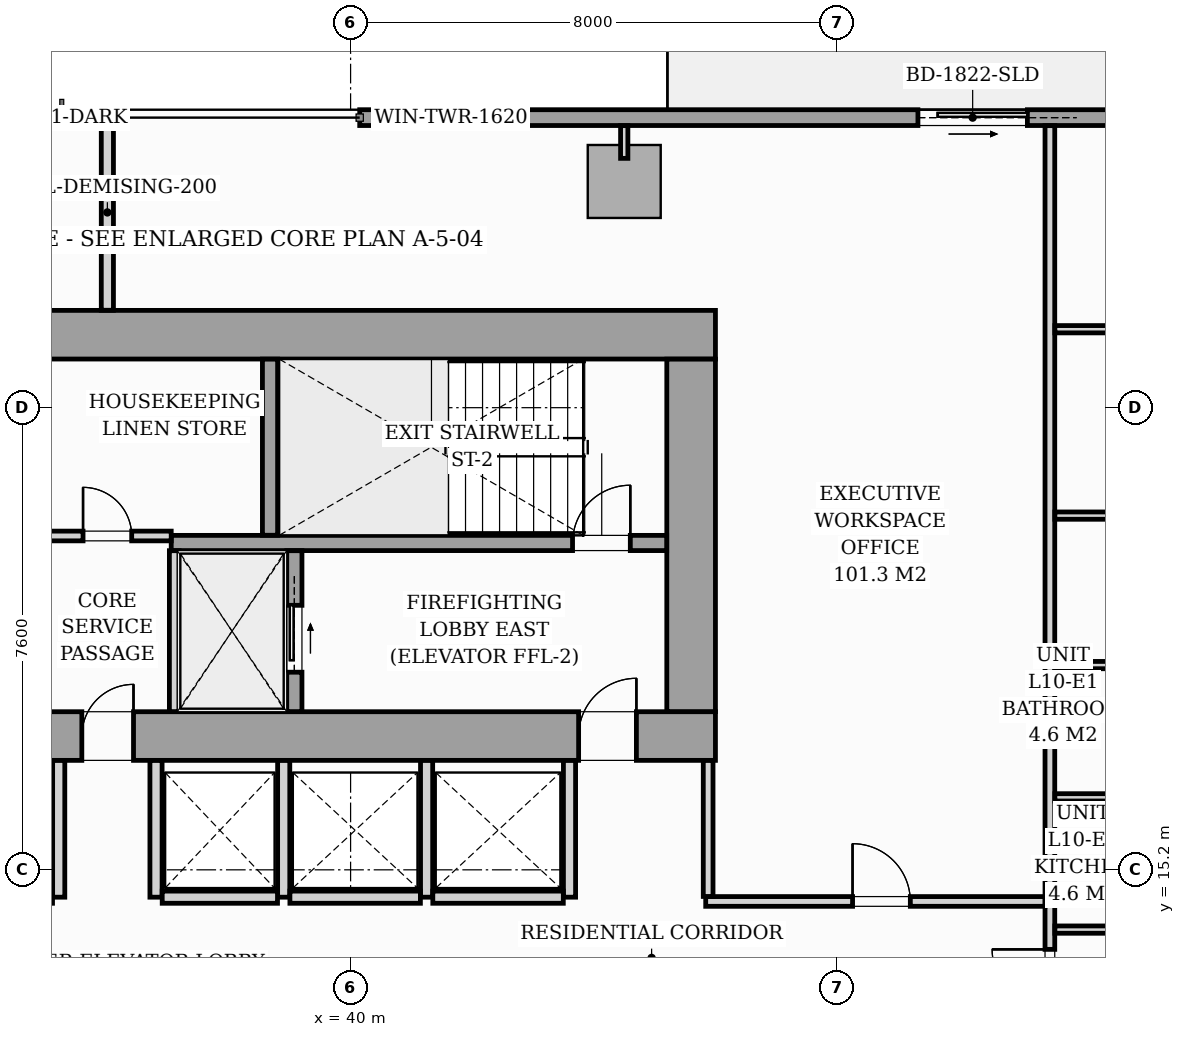
"""IFC4 building model, lengths in metres.
Left out: names, types, materials, properties, quantities, classifications, styles, units other than length and angle.
Written with IfcOpenShell. Run it as: python <this file> out.ifc"""

import sys

from ifc_helpers import new_model, si_unit, direction, frame, frame_2d, origin, origin_2d, place, context, subcontext, project, spatial, rectangle, i_section, extrude, source, transform, mapped, element, fill, save


model = new_model("IFC4")
c1 = context("Model", 3, precision=1e-05, world=origin(), true_north=direction((0.0, 1.0)))
c2 = subcontext(c1, "Body", "Model", "MODEL_VIEW")
j1 = project(units=[si_unit("LENGTHUNIT", "METRE"), si_unit("PLANEANGLEUNIT", "RADIAN")], contexts=[c1])
p1 = place(None, origin())
s1 = spatial("IfcSite", under=j1, at=p1, CompositionType="ELEMENT")
p2 = place(p1, origin())
s2 = spatial("IfcBuilding", under=s1, at=p2, CompositionType="ELEMENT")
p3 = place(p2, frame((0.0, 0.0, 39.0)))
s3 = spatial("IfcBuildingStorey", under=s2, at=p3, CompositionType="ELEMENT", Elevation=39.0)
m1 = source(origin(), c2, "Body", "SweptSolid", [
    extrude(i_section(OverallWidth=0.437, OverallDepth=0.514, WebThickness=0.061, FlangeThickness=0.097, FilletRadius=0.018, at=origin_2d()), origin(), (0.0, 0.0, 1.0), 3.196),
])
for number, where, z_axis, x_axis in (
    (1, (38.88, 17.4, 0.002), (0.0, 0.0, 1.0), (1.0, 0.0, 0.0)),
    (2, (45.6, 17.4, 0.002), (0.0, 0.0, 1.0), (1.0, 0.0, 0.0)),
    (3, (38.88, 24.0, 0.002), (0.0, 0.0, 1.0), (1.0, 0.0, 0.0)),
    (4, (45.6, 24.0, 0.002), (0.0, 0.0, 1.0), (1.0, 0.0, 0.0)),
):
    element("IfcColumn", number, at=place(p3, frame(where, z_axis=z_axis, x_axis=x_axis)), inside=s3, PredefinedType="PILASTER", context=c2, shape_type="MappedRepresentation", body=[
        mapped(m1, transform((0.0, 0.0, 0.0), scale=1.0)),
    ])
m2 = source(origin(), c2, "Body", "SweptSolid", [
    extrude(rectangle(XDim=1.2, YDim=1.2, at=origin_2d()), origin(), (0.0, 0.0, 1.0), 3.196),
])
p4 = place(p3, frame((44.5, 26.52, 0.002), z_axis=(0.0, 0.0, 1.0), x_axis=(1.0, 0.0, 0.0)))
e5 = element("IfcColumn", 5, at=p4, inside=s3, PredefinedType="COLUMN", context=c2, shape_type="MappedRepresentation", body=[
    mapped(m2, transform((0.0, 0.0, 0.0), scale=1.0)),
])
p5 = place(p3, frame((40.15, 27.57, 0.0), z_axis=(0.0, 0.0, 1.0), x_axis=(1.0, 0.0, 0.0)))
e6 = element("IfcWall", 6, at=p5, inside=s3, PredefinedType="STANDARD", context=c2, shape_type="SweptSolid", body=[
    extrude(rectangle(XDim=17.15, YDim=0.26, at=frame_2d((8.575, 0.0))), origin(), (0.0, 0.0, 1.0), 2.94),
])
p6 = place(p5, frame((9.18, 0.0, 0.0)))
e7 = element("IfcOpeningElement", 7, at=p6, cuts=e6, PredefinedType="OPENING", context=c2, shape_type="SweptSolid", body=[
    extrude(rectangle(XDim=1.8, YDim=2.06, at=frame_2d((0.9, 1.03))), frame((0.0, 0.14, 0.0), z_axis=(0.0, -1.0, 0.0), x_axis=(1.0, 0.0, 0.0)), (0.0, 0.0, 1.0), 0.28),
])
p7 = place(p5, frame((0.7, 0.0, 0.65)))
e8 = element("IfcOpeningElement", 8, at=p7, cuts=e6, PredefinedType="OPENING", context=c2, shape_type="SweptSolid", body=[
    extrude(rectangle(XDim=1.6, YDim=1.5, at=frame_2d((0.8, 0.75))), frame((0.0, 0.14, 0.0), z_axis=(0.0, -1.0, 0.0), x_axis=(1.0, 0.0, 0.0)), (0.0, 0.0, 1.0), 0.28),
])
p8 = place(p3, frame((26.0, 17.4, 0.0), z_axis=(0.0, 0.0, 1.0), x_axis=(1.0, 0.0, 0.0)))
e9 = element("IfcWall", 9, at=p8, inside=s3, PredefinedType="SHEAR", context=c2, shape_type="SweptSolid", body=[
    extrude(rectangle(XDim=20.0, YDim=0.8, at=frame_2d((10.0, 0.0))), origin(), (0.0, 0.0, 1.0), 3.2),
])
p9 = place(p8, frame((1.15, 0.0, 0.0)))
e10 = element("IfcOpeningElement", 10, at=p9, cuts=e9, PredefinedType="OPENING", context=c2, shape_type="SweptSolid", body=[
    extrude(rectangle(XDim=0.95, YDim=2.06, at=frame_2d((0.475, 1.03))), frame((0.0, 0.41, 0.0), z_axis=(0.0, -1.0, 0.0), x_axis=(1.0, 0.0, 0.0)), (0.0, 0.0, 1.0), 0.82),
])
p10 = place(p8, frame((9.58, 0.0, 0.0)))
e11 = element("IfcOpeningElement", 11, at=p10, cuts=e9, PredefinedType="OPENING", context=c2, shape_type="SweptSolid", body=[
    extrude(rectangle(XDim=0.85, YDim=2.0, at=frame_2d((0.425, 1.0))), frame((0.0, 0.41, 0.0), z_axis=(0.0, -1.0, 0.0), x_axis=(1.0, 0.0, 0.0)), (0.0, 0.0, 1.0), 0.82),
])
p11 = place(p8, frame((17.75, 0.0, 0.0)))
e12 = element("IfcOpeningElement", 12, at=p11, cuts=e9, PredefinedType="OPENING", context=c2, shape_type="SweptSolid", body=[
    extrude(rectangle(XDim=0.95, YDim=2.06, at=frame_2d((0.475, 1.03))), frame((0.0, 0.41, 0.0), z_axis=(0.0, -1.0, 0.0), x_axis=(1.0, 0.0, 0.0)), (0.0, 0.0, 1.0), 0.82),
])
p12 = place(p3, frame((26.0, 24.0, 0.0), z_axis=(0.0, 0.0, 1.0), x_axis=(1.0, 0.0, 0.0)))
e13 = element("IfcWall", 13, at=p12, inside=s3, PredefinedType="SHEAR", context=c2, shape_type="SweptSolid", body=[
    extrude(rectangle(XDim=20.0, YDim=0.8, at=frame_2d((10.0, 0.0))), origin(), (0.0, 0.0, 1.0), 3.2),
])
p13 = place(p3, frame((45.6, 17.802, 0.0), z_axis=(0.0, 0.0, 1.0), x_axis=(0.0, 1.0, 0.0)))
e14 = element("IfcWall", 14, at=p13, inside=s3, PredefinedType="SHEAR", context=c2, shape_type="SweptSolid", body=[
    extrude(rectangle(XDim=5.796, YDim=0.8, at=frame_2d((2.898, 0.0))), origin(), (0.0, 0.0, 1.0), 3.2),
])
p14 = place(p3, frame((37.05, 20.575, 0.0), z_axis=(0.0, 0.0, 1.0), x_axis=(1.0, 0.0, 0.0)))
e15 = element("IfcWall", 15, at=p14, inside=s3, PredefinedType="SOLIDWALL", context=c2, shape_type="SweptSolid", body=[
    extrude(rectangle(XDim=8.148, YDim=0.25, at=frame_2d((4.074, 0.0))), origin(), (0.0, 0.0, 1.0), 3.2),
])
p15 = place(p14, frame((6.6, 0.0, 0.0)))
e16 = element("IfcOpeningElement", 16, at=p15, cuts=e15, PredefinedType="OPENING", context=c2, shape_type="SweptSolid", body=[
    extrude(rectangle(XDim=0.95, YDim=2.06, at=frame_2d((0.475, 1.03))), frame((0.0, 0.135, 0.0), z_axis=(0.0, -1.0, 0.0), x_axis=(1.0, 0.0, 0.0)), (0.0, 0.0, 1.0), 0.27),
])
p16 = place(p3, frame((38.675, 20.702, 0.0), z_axis=(0.0, 0.0, 1.0), x_axis=(0.0, 1.0, 0.0)))
e17 = element("IfcWall", 17, at=p16, inside=s3, PredefinedType="SOLIDWALL", context=c2, shape_type="SweptSolid", body=[
    extrude(rectangle(XDim=2.896, YDim=0.25, at=frame_2d((1.448, 0.0))), origin(), (0.0, 0.0, 1.0), 3.2),
])
p17 = place(p3, frame((37.1, 17.802, 0.0), z_axis=(0.0, 0.0, 1.0), x_axis=(0.0, 1.0, 0.0)))
e18 = element("IfcWall", 18, at=p17, inside=s3, PredefinedType="PARTITIONING", context=c2, shape_type="SweptSolid", body=[
    extrude(rectangle(XDim=2.646, YDim=0.16, at=frame_2d((1.323, 0.0))), origin(), (0.0, 0.0, 1.0), 2.94),
])
p18 = place(p3, frame((39.075, 17.802, 0.0), z_axis=(0.0, 0.0, 1.0), x_axis=(0.0, 1.0, 0.0)))
e19 = element("IfcWall", 19, at=p18, inside=s3, PredefinedType="SOLIDWALL", context=c2, shape_type="SweptSolid", body=[
    extrude(rectangle(XDim=2.646, YDim=0.25, at=frame_2d((1.323, 0.0))), origin(), (0.0, 0.0, 1.0), 3.2),
])
p19 = place(p18, frame((0.648, 0.0, 0.0)))
e20 = element("IfcOpeningElement", 20, at=p19, cuts=e19, PredefinedType="OPENING", context=c2, shape_type="SweptSolid", body=[
    extrude(rectangle(XDim=1.1, YDim=2.08, at=frame_2d((0.55, 1.04))), frame((0.0, 0.135, 0.0), z_axis=(0.0, -1.0, 0.0), x_axis=(1.0, 0.0, 0.0)), (0.0, 0.0, 1.0), 0.27),
])
p20 = place(p3, frame((34.95, 20.69, 0.0), z_axis=(0.0, 0.0, 1.0), x_axis=(1.0, 0.0, 0.0)))
e21 = element("IfcWall", 21, at=p20, inside=s3, PredefinedType="PARTITIONING", context=c2, shape_type="SweptSolid", body=[
    extrude(rectangle(XDim=2.1, YDim=0.16, at=frame_2d((1.05, 0.0))), origin(), (0.0, 0.0, 1.0), 2.94),
])
p21 = place(p20, frame((0.65, 0.0, 0.0)))
e22 = element("IfcOpeningElement", 22, at=p21, cuts=e21, PredefinedType="OPENING", context=c2, shape_type="SweptSolid", body=[
    extrude(rectangle(XDim=0.8, YDim=2.05, at=frame_2d((0.4, 1.025))), frame((0.0, 0.09, 0.0), z_axis=(0.0, -1.0, 0.0), x_axis=(1.0, 0.0, 0.0)), (0.0, 0.0, 1.0), 0.18),
])
for number, where, z_axis, x_axis in (
    (23, (35.2, 14.75, 0.0), (0.0, 0.0, 1.0), (0.0, 1.0, 0.0)),
    (24, (36.8, 14.75, 0.0), (0.0, 0.0, 1.0), (0.0, 1.0, 0.0)),
    (25, (38.9, 14.75, 0.0), (0.0, 0.0, 1.0), (0.0, 1.0, 0.0)),
):
    element("IfcWall", number, at=place(p3, frame(where, z_axis=z_axis, x_axis=x_axis)), inside=s3, PredefinedType="PARTITIONING", context=c2, shape_type="SweptSolid", body=[
        extrude(rectangle(XDim=2.248, YDim=0.2, at=frame_2d((1.124, 0.0))), origin(), (0.0, 0.0, 1.0), 2.94),
    ])
p22 = place(p3, frame((36.902, 14.75, 0.0), z_axis=(0.0, 0.0, 1.0), x_axis=(1.0, 0.0, 0.0)))
e26 = element("IfcWall", 26, at=p22, inside=s3, PredefinedType="PARTITIONING", context=c2, shape_type="SweptSolid", body=[
    extrude(rectangle(XDim=1.896, YDim=0.2, at=frame_2d((0.948, 0.0))), origin(), (0.0, 0.0, 1.0), 2.94),
])
for number, where, z_axis, x_axis in (
    (27, (41.25, 14.75, 0.0), (0.0, 0.0, 1.0), (0.0, 1.0, 0.0)),
    (28, (43.6, 14.75, 0.0), (0.0, 0.0, 1.0), (0.0, 1.0, 0.0)),
):
    element("IfcWall", number, at=place(p3, frame(where, z_axis=z_axis, x_axis=x_axis)), inside=s3, PredefinedType="PARTITIONING", context=c2, shape_type="SweptSolid", body=[
        extrude(rectangle(XDim=2.248, YDim=0.2, at=frame_2d((1.124, 0.0))), origin(), (0.0, 0.0, 1.0), 2.94),
    ])
for number, where, z_axis, x_axis in (
    (29, (39.002, 14.75, 0.0), (0.0, 0.0, 1.0), (1.0, 0.0, 0.0)),
    (30, (41.352, 14.75, 0.0), (0.0, 0.0, 1.0), (1.0, 0.0, 0.0)),
):
    element("IfcWall", number, at=place(p3, frame(where, z_axis=z_axis, x_axis=x_axis)), inside=s3, PredefinedType="PARTITIONING", context=c2, shape_type="SweptSolid", body=[
        extrude(rectangle(XDim=2.146, YDim=0.2, at=frame_2d((1.073, 0.0))), origin(), (0.0, 0.0, 1.0), 2.94),
    ])
p23 = place(p3, frame((51.5, 12.572, 0.0), z_axis=(0.0, 0.0, 1.0), x_axis=(0.0, 1.0, 0.0)))
e31 = element("IfcWall", 31, at=p23, inside=s3, PredefinedType="PARTITIONING", context=c2, shape_type="SweptSolid", body=[
    extrude(rectangle(XDim=14.866, YDim=0.16, at=frame_2d((7.433, 0.0))), origin(), (0.0, 0.0, 1.0), 2.94),
])
p24 = place(p23, frame((0.37, 0.0, 0.0)))
e32 = element("IfcOpeningElement", 32, at=p24, cuts=e31, PredefinedType="OPENING", context=c2, shape_type="SweptSolid", body=[
    extrude(rectangle(XDim=0.95, YDim=2.06, at=frame_2d((0.475, 1.03))), frame((0.0, 0.09, 0.0), z_axis=(0.0, -1.0, 0.0), x_axis=(1.0, 0.0, 0.0)), (0.0, 0.0, 1.0), 0.18),
])
p25 = place(p3, frame((36.0, 24.402, 0.0), z_axis=(0.0, 0.0, 1.0), x_axis=(0.0, 1.0, 0.0)))
e33 = element("IfcWall", 33, at=p25, inside=s3, PredefinedType="PARTITIONING", context=c2, shape_type="SweptSolid", body=[
    extrude(rectangle(XDim=3.218, YDim=0.2, at=frame_2d((1.609, 0.0))), origin(), (0.0, 0.0, 1.0), 2.94),
])
p26 = place(p3, frame((51.582, 16.392, 0.0), z_axis=(0.0, 0.0, 1.0), x_axis=(1.0, 0.0, 0.0)))
e34 = element("IfcWall", 34, at=p26, inside=s3, PredefinedType="PARTITIONING", context=c2, shape_type="SweptSolid", body=[
    extrude(rectangle(XDim=2.256, YDim=0.12, at=frame_2d((1.128, 0.0))), origin(), (0.0, 0.0, 1.0), 2.045),
])
for number, where, z_axis, x_axis in (
    (35, (51.582, 14.217, 0.0), (0.0, 0.0, 1.0), (1.0, 0.0, 0.0)),
    (36, (51.582, 18.567, 0.0), (0.0, 0.0, 1.0), (1.0, 0.0, 0.0)),
):
    element("IfcWall", number, at=place(p3, frame(where, z_axis=z_axis, x_axis=x_axis)), inside=s3, PredefinedType="PARTITIONING", context=c2, shape_type="SweptSolid", body=[
        extrude(rectangle(XDim=2.256, YDim=0.12, at=frame_2d((1.128, 0.0))), origin(), (0.0, 0.0, 1.0), 2.94),
    ])
p27 = place(p3, frame((51.582, 24.09, 0.0), z_axis=(0.0, 0.0, 1.0), x_axis=(1.0, 0.0, 0.0)))
e37 = element("IfcWall", 37, at=p27, inside=s3, PredefinedType="PARTITIONING", context=c2, shape_type="SweptSolid", body=[
    extrude(rectangle(XDim=8.138, YDim=0.12, at=frame_2d((4.069, 0.0))), origin(), (0.0, 0.0, 1.0), 2.94),
])
p28 = place(p27, frame((3.653, 0.0, 0.0)))
e38 = element("IfcOpeningElement", 38, at=p28, cuts=e37, PredefinedType="OPENING", context=c2, shape_type="SweptSolid", body=[
    extrude(rectangle(XDim=0.85, YDim=2.05, at=frame_2d((0.425, 1.025))), frame((0.0, 0.07, 0.0), z_axis=(0.0, -1.0, 0.0), x_axis=(1.0, 0.0, 0.0)), (0.0, 0.0, 1.0), 0.14),
])
p29 = place(p3, frame((51.582, 21.025, 0.0), z_axis=(0.0, 0.0, 1.0), x_axis=(1.0, 0.0, 0.0)))
e39 = element("IfcWall", 39, at=p29, inside=s3, PredefinedType="PARTITIONING", context=c2, shape_type="SweptSolid", body=[
    extrude(rectangle(XDim=8.138, YDim=0.12, at=frame_2d((4.069, 0.0))), origin(), (0.0, 0.0, 1.0), 2.94),
])
p30 = place(p29, frame((3.653, 0.0, 0.0)))
e40 = element("IfcOpeningElement", 40, at=p30, cuts=e39, PredefinedType="OPENING", context=c2, shape_type="SweptSolid", body=[
    extrude(rectangle(XDim=0.85, YDim=2.05, at=frame_2d((0.425, 1.025))), frame((0.0, 0.07, 0.0), z_axis=(0.0, -1.0, 0.0), x_axis=(1.0, 0.0, 0.0)), (0.0, 0.0, 1.0), 0.14),
])
p31 = place(p3, frame((45.84, 14.68, 0.0), z_axis=(0.0, 0.0, 1.0), x_axis=(1.0, 0.0, 0.0)))
e41 = element("IfcWall", 41, at=p31, inside=s3, PredefinedType="PARTITIONING", context=c2, shape_type="SweptSolid", body=[
    extrude(rectangle(XDim=5.578, YDim=0.16, at=frame_2d((2.789, 0.0))), origin(), (0.0, 0.0, 1.0), 2.94),
])
p32 = place(p31, frame((2.415, 0.0, 0.0)))
e42 = element("IfcOpeningElement", 42, at=p32, cuts=e41, PredefinedType="OPENING", context=c2, shape_type="SweptSolid", body=[
    extrude(rectangle(XDim=0.95, YDim=2.06, at=frame_2d((0.475, 1.03))), frame((0.0, 0.09, 0.0), z_axis=(0.0, -1.0, 0.0), x_axis=(1.0, 0.0, 0.0)), (0.0, 0.0, 1.0), 0.18),
])
p33 = place(p3, frame((45.88, 14.762, 0.0), z_axis=(0.0, 0.0, 1.0), x_axis=(0.0, 1.0, 0.0)))
e43 = element("IfcWall", 43, at=p33, inside=s3, PredefinedType="PARTITIONING", context=c2, shape_type="SweptSolid", body=[
    extrude(rectangle(XDim=2.236, YDim=0.16, at=frame_2d((1.118, 0.0))), origin(), (0.0, 0.0, 1.0), 2.94),
])
p34 = place(p3, frame((44.5, 26.9, 0.0), z_axis=(0.0, 0.0, 1.0), x_axis=(0.0, 1.0, 0.0)))
e44 = element("IfcWall", 44, at=p34, inside=s3, PredefinedType="PARTITIONING", context=c2, shape_type="SweptSolid", body=[
    extrude(rectangle(XDim=0.538, YDim=0.12, at=frame_2d((0.269, 0.0))), origin(), (0.0, 0.0, 1.0), 2.94),
])
m3 = source(origin(), c2, "Body", "SweptSolid", [
    extrude(rectangle(XDim=1.8, YDim=2.06, at=frame_2d((0.9, 1.03))), frame((0.0, 0.025, 0.0), z_axis=(0.0, -1.0, 0.0), x_axis=(1.0, 0.0, 0.0)), (0.0, 0.0, 1.0), 0.05),
])
p35 = place(p6, origin())
e45 = element("IfcDoor", 45, at=p35, inside=s3, OperationType="SLIDING_TO_RIGHT", PredefinedType="DOOR", context=c2, shape_type="MappedRepresentation", body=[
    mapped(m3, transform((0.0, 0.0, 0.0), scale=1.0)),
])
fill(e7, e45)
m4 = source(origin(), c2, "Body", "SweptSolid", [
    extrude(rectangle(XDim=1.6, YDim=1.5, at=frame_2d((0.8, 0.75))), frame((0.0, 0.03, 0.0), z_axis=(0.0, -1.0, 0.0), x_axis=(1.0, 0.0, 0.0)), (0.0, 0.0, 1.0), 0.06),
])
p36 = place(p7, origin())
e46 = element("IfcWindow", 46, at=p36, inside=s3, PartitioningType="SINGLE_PANEL", PredefinedType="WINDOW", context=c2, shape_type="MappedRepresentation", body=[
    mapped(m4, transform((0.0, 0.0, 0.0), scale=1.0)),
])
fill(e8, e46)
m5 = source(origin(), c2, "Body", "SweptSolid", [
    extrude(rectangle(XDim=0.85, YDim=2.0, at=frame_2d((0.425, 1.0))), frame((0.0, 0.025, 0.0), z_axis=(0.0, -1.0, 0.0), x_axis=(1.0, 0.0, 0.0)), (0.0, 0.0, 1.0), 0.05),
])
p37 = place(p10, origin())
e47 = element("IfcDoor", 47, at=p37, inside=s3, OperationType="SINGLE_SWING_RIGHT", PredefinedType="DOOR", context=c2, shape_type="MappedRepresentation", body=[
    mapped(m5, transform((0.0, 0.0, 0.0), scale=1.0)),
])
fill(e11, e47)
m6 = source(origin(), c2, "Body", "SweptSolid", [
    extrude(rectangle(XDim=0.95, YDim=2.06, at=frame_2d((0.475, 1.03))), frame((0.0, 0.025, 0.0), z_axis=(0.0, -1.0, 0.0), x_axis=(1.0, 0.0, 0.0)), (0.0, 0.0, 1.0), 0.05),
])
p38 = place(p11, origin())
e48 = element("IfcDoor", 48, at=p38, inside=s3, OperationType="SINGLE_SWING_RIGHT", PredefinedType="DOOR", context=c2, shape_type="MappedRepresentation", body=[
    mapped(m6, transform((0.0, 0.0, 0.0), scale=1.0)),
])
fill(e12, e48)
p39 = place(p15, origin())
e49 = element("IfcDoor", 49, at=p39, inside=s3, OperationType="SINGLE_SWING_RIGHT", PredefinedType="DOOR", context=c2, shape_type="MappedRepresentation", body=[
    mapped(m6, transform((0.0, 0.0, 0.0), scale=1.0)),
])
fill(e16, e49)
m7 = source(origin(), c2, "Body", "SweptSolid", [
    extrude(rectangle(XDim=1.1, YDim=2.08, at=frame_2d((0.55, 1.04))), frame((0.0, 0.025, 0.0), z_axis=(0.0, -1.0, 0.0), x_axis=(1.0, 0.0, 0.0)), (0.0, 0.0, 1.0), 0.05),
])
p40 = place(p19, origin())
e50 = element("IfcDoor", 50, at=p40, inside=s3, OperationType="SLIDING_TO_RIGHT", PredefinedType="DOOR", context=c2, shape_type="MappedRepresentation", body=[
    mapped(m7, transform((0.0, 0.0, 0.0), scale=1.0)),
])
fill(e20, e50)
m8 = source(origin(), c2, "Body", "SweptSolid", [
    extrude(rectangle(XDim=0.8, YDim=2.05, at=frame_2d((0.4, 1.025))), frame((0.0, 0.025, 0.0), z_axis=(0.0, -1.0, 0.0), x_axis=(1.0, 0.0, 0.0)), (0.0, 0.0, 1.0), 0.05),
])
p41 = place(p21, origin())
e51 = element("IfcDoor", 51, at=p41, inside=s3, OperationType="SINGLE_SWING_LEFT", PredefinedType="DOOR", context=c2, shape_type="MappedRepresentation", body=[
    mapped(m8, transform((0.0, 0.0, 0.0), scale=1.0)),
])
fill(e22, e51)
m9 = source(origin(), c2, "Body", "SweptSolid", [
    extrude(rectangle(XDim=0.95, YDim=2.06, at=frame_2d((0.475, 1.03))), frame((0.0, 0.025, 0.0), z_axis=(0.0, -1.0, 0.0), x_axis=(1.0, 0.0, 0.0)), (0.0, 0.0, 1.0), 0.05),
])
p42 = place(p24, origin())
e52 = element("IfcDoor", 52, at=p42, inside=s3, OperationType="SINGLE_SWING_RIGHT", PredefinedType="DOOR", context=c2, shape_type="MappedRepresentation", body=[
    mapped(m9, transform((0.0, 0.0, 0.0), scale=1.0)),
])
fill(e32, e52)
p43 = place(p32, origin())
e53 = element("IfcDoor", 53, at=p43, inside=s3, OperationType="SINGLE_SWING_LEFT", PredefinedType="DOOR", context=c2, shape_type="MappedRepresentation", body=[
    mapped(m9, transform((0.0, 0.0, 0.0), scale=1.0)),
])
fill(e42, e53)
save(model, sys.argv[1])
